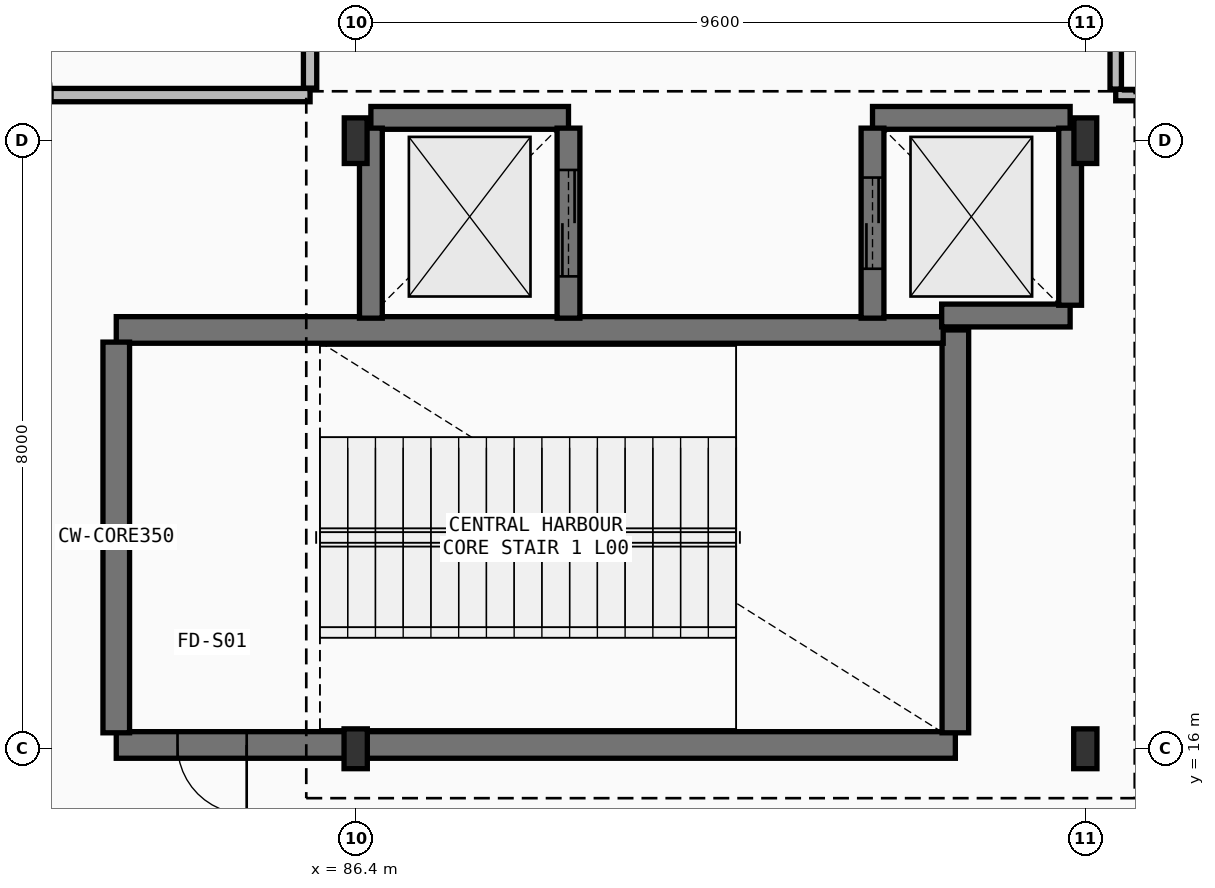
"""IFC4 building model, lengths in metres.
Left out: names, types, materials, properties, quantities, classifications, styles, units other than length and angle.
Written with IfcOpenShell. Run it as: python <this file> out.ifc"""

import sys

from ifc_helpers import new_model, si_unit, direction, frame, frame_2d, origin, origin_2d, place, context, subcontext, project, spatial, rectangle, i_section, extrude, element, fill, save


model = new_model("IFC4")
c1 = context("Model", 3, precision=1e-05, world=origin(), true_north=direction((0.0, 1.0)))
c2 = subcontext(c1, "Body", "Model", "MODEL_VIEW")
j1 = project(units=[si_unit("LENGTHUNIT", "METRE"), si_unit("PLANEANGLEUNIT", "RADIAN")], contexts=[c1])
p1 = place(None, origin())
s1 = spatial("IfcSite", under=j1, at=p1, CompositionType="ELEMENT")
p2 = place(p1, origin())
s2 = spatial("IfcBuilding", under=s1, at=p2, CompositionType="ELEMENT")
p3 = place(p2, origin())
s3 = spatial("IfcBuildingStorey", under=s2, at=p3, CompositionType="ELEMENT", Elevation=0.0)
p4 = place(p3, frame((86.4, 16.0, 0.0), z_axis=(0.0, 0.0, 1.0), x_axis=(1.0, 0.0, 0.0)))
e1 = element("IfcColumn", 1, at=p4, inside=s3, PredefinedType="COLUMN", context=c2, shape_type="SweptSolid", body=[
    extrude(i_section(OverallWidth=0.306, OverallDepth=0.524, WebThickness=0.021, FlangeThickness=0.04, FilletRadius=0.027, at=origin_2d()), origin(), (0.0, 0.0, 1.0), 6.0),
])
p5 = place(p3, frame((86.4, 24.0, 0.0), z_axis=(0.0, 0.0, 1.0), x_axis=(1.0, 0.0, 0.0)))
e2 = element("IfcColumn", 2, at=p5, inside=s3, PredefinedType="COLUMN", context=c2, shape_type="SweptSolid", body=[
    extrude(i_section(OverallWidth=0.3, OverallDepth=0.6, WebThickness=0.015, FlangeThickness=0.03, FilletRadius=0.027, at=origin_2d()), origin(), (0.0, 0.0, 1.0), 6.0),
])
p6 = place(p3, frame((96.0, 16.0, 0.0), z_axis=(0.0, 0.0, 1.0), x_axis=(1.0, 0.0, 0.0)))
e3 = element("IfcColumn", 3, at=p6, inside=s3, PredefinedType="COLUMN", context=c2, shape_type="SweptSolid", body=[
    extrude(i_section(OverallWidth=0.306, OverallDepth=0.524, WebThickness=0.021, FlangeThickness=0.04, FilletRadius=0.027, at=origin_2d()), origin(), (0.0, 0.0, 1.0), 6.0),
])
p7 = place(p3, frame((96.0, 24.0, 0.0), z_axis=(0.0, 0.0, 1.0), x_axis=(1.0, 0.0, 0.0)))
e4 = element("IfcColumn", 4, at=p7, inside=s3, PredefinedType="COLUMN", context=c2, shape_type="SweptSolid", body=[
    extrude(i_section(OverallWidth=0.3, OverallDepth=0.6, WebThickness=0.015, FlangeThickness=0.03, FilletRadius=0.027, at=origin_2d()), origin(), (0.0, 0.0, 1.0), 6.0),
])
p8 = place(p3, frame((94.29, 16.05, 0.0), z_axis=(0.0, 0.0, 1.0), x_axis=(-1.0, 0.0, 0.0)))
e5 = element("IfcWall", 5, at=p8, inside=s3, PredefinedType="SHEAR", context=c2, shape_type="SweptSolid", body=[
    extrude(rectangle(XDim=11.04, YDim=0.35, at=frame_2d((5.52, 0.0))), origin(), (0.0, 0.0, 1.0), 5.77),
])
p9 = place(p8, frame((9.324, 0.0, 0.0)))
e6 = element("IfcOpeningElement", 6, at=p9, cuts=e5, PredefinedType="OPENING", context=c2, shape_type="SweptSolid", body=[
    extrude(rectangle(XDim=0.91, YDim=2.08, at=frame_2d((0.455, 1.04))), frame((0.0, 0.185, 0.0), z_axis=(0.0, -1.0, 0.0), x_axis=(1.0, 0.0, 0.0)), (0.0, 0.0, 1.0), 0.37),
])
p10 = place(p3, frame((94.29, 21.51, 0.0), z_axis=(0.0, 0.0, 1.0), x_axis=(0.0, -1.0, 0.0)))
e7 = element("IfcWall", 7, at=p10, inside=s3, PredefinedType="SHEAR", context=c2, shape_type="SweptSolid", body=[
    extrude(rectangle(XDim=5.3, YDim=0.35, at=frame_2d((2.65, 0.0))), origin(), (0.0, 0.0, 1.0), 5.77),
])
p11 = place(p3, frame((83.25, 21.51, 0.0), z_axis=(0.0, 0.0, 1.0), x_axis=(1.0, 0.0, 0.0)))
e8 = element("IfcWall", 8, at=p11, inside=s3, PredefinedType="SHEAR", context=c2, shape_type="SweptSolid", body=[
    extrude(rectangle(XDim=10.88, YDim=0.35, at=frame_2d((5.44, 0.0))), origin(), (0.0, 0.0, 1.0), 5.77),
])
p12 = place(p3, frame((83.25, 16.21, 0.0), z_axis=(0.0, 0.0, 1.0), x_axis=(0.0, 1.0, 0.0)))
e9 = element("IfcWall", 9, at=p12, inside=s3, PredefinedType="SHEAR", context=c2, shape_type="SweptSolid", body=[
    extrude(rectangle(XDim=5.14, YDim=0.35, at=frame_2d((2.57, 0.0))), origin(), (0.0, 0.0, 1.0), 5.77),
])
p13 = place(p3, frame((89.2, 24.3, 0.0), z_axis=(0.0, 0.0, 1.0), x_axis=(-1.0, 0.0, 0.0)))
e10 = element("IfcWall", 10, at=p13, inside=s3, PredefinedType="SHEAR", context=c2, shape_type="SweptSolid", body=[
    extrude(rectangle(XDim=2.6, YDim=0.3, at=frame_2d((1.3, 0.0))), origin(), (0.0, 0.0, 1.0), 5.77),
])
p14 = place(p3, frame((89.2, 21.665, 0.0), z_axis=(0.0, 0.0, 1.0), x_axis=(0.0, 1.0, 0.0)))
e11 = element("IfcWall", 11, at=p14, inside=s3, PredefinedType="SHEAR", context=c2, shape_type="SweptSolid", body=[
    extrude(rectangle(XDim=2.5, YDim=0.3, at=frame_2d((1.25, 0.0))), origin(), (0.0, 0.0, 1.0), 5.77),
])
p15 = place(p14, frame((0.55, 0.0, 0.0)))
e12 = element("IfcOpeningElement", 12, at=p15, cuts=e11, PredefinedType="OPENING", context=c2, shape_type="SweptSolid", body=[
    extrude(rectangle(XDim=1.4, YDim=2.26, at=frame_2d((0.7, 1.13))), frame((0.0, 0.16, 0.0), z_axis=(0.0, -1.0, 0.0), x_axis=(1.0, 0.0, 0.0)), (0.0, 0.0, 1.0), 0.32),
])
p16 = place(p3, frame((86.6, 24.165, 0.0), z_axis=(0.0, 0.0, 1.0), x_axis=(0.0, -1.0, 0.0)))
e13 = element("IfcWall", 13, at=p16, inside=s3, PredefinedType="SHEAR", context=c2, shape_type="SweptSolid", body=[
    extrude(rectangle(XDim=2.5, YDim=0.3, at=frame_2d((1.25, 0.0))), origin(), (0.0, 0.0, 1.0), 5.77),
])
p17 = place(p3, frame((95.8, 24.3, 0.0), z_axis=(0.0, 0.0, 1.0), x_axis=(-1.0, 0.0, 0.0)))
e14 = element("IfcWall", 14, at=p17, inside=s3, PredefinedType="SHEAR", context=c2, shape_type="SweptSolid", body=[
    extrude(rectangle(XDim=2.6, YDim=0.3, at=frame_2d((1.3, 0.0))), origin(), (0.0, 0.0, 1.0), 5.77),
])
p18 = place(p3, frame((94.11, 21.7, 0.0), z_axis=(0.0, 0.0, 1.0), x_axis=(1.0, 0.0, 0.0)))
e15 = element("IfcWall", 15, at=p18, inside=s3, PredefinedType="SHEAR", context=c2, shape_type="SweptSolid", body=[
    extrude(rectangle(XDim=1.69, YDim=0.3, at=frame_2d((0.845, 0.0))), origin(), (0.0, 0.0, 1.0), 5.77),
])
p19 = place(p3, frame((95.8, 21.835, 0.0), z_axis=(0.0, 0.0, 1.0), x_axis=(0.0, 1.0, 0.0)))
e16 = element("IfcWall", 16, at=p19, inside=s3, PredefinedType="SHEAR", context=c2, shape_type="SweptSolid", body=[
    extrude(rectangle(XDim=2.33, YDim=0.3, at=frame_2d((1.165, 0.0))), origin(), (0.0, 0.0, 1.0), 5.77),
])
p20 = place(p3, frame((93.2, 24.165, 0.0), z_axis=(0.0, 0.0, 1.0), x_axis=(0.0, -1.0, 0.0)))
e17 = element("IfcWall", 17, at=p20, inside=s3, PredefinedType="SHEAR", context=c2, shape_type="SweptSolid", body=[
    extrude(rectangle(XDim=2.5, YDim=0.3, at=frame_2d((1.25, 0.0))), origin(), (0.0, 0.0, 1.0), 5.77),
])
p21 = place(p20, frame((0.65, 0.0, 0.0)))
e18 = element("IfcOpeningElement", 18, at=p21, cuts=e17, PredefinedType="OPENING", context=c2, shape_type="SweptSolid", body=[
    extrude(rectangle(XDim=1.2, YDim=2.2, at=frame_2d((0.6, 1.1))), frame((0.0, 0.16, 0.0), z_axis=(0.0, -1.0, 0.0), x_axis=(1.0, 0.0, 0.0)), (0.0, 0.0, 1.0), 0.32),
])
p22 = place(p3, frame((69.2, 24.6, 0.0), z_axis=(0.0, 0.0, 1.0), x_axis=(1.0, 0.0, 0.0)))
e19 = element("IfcWall", 19, at=p22, inside=s3, PredefinedType="PARTITIONING", context=c2, shape_type="SweptSolid", body=[
    extrude(rectangle(XDim=16.6, YDim=0.175, at=frame_2d((8.3, 0.0))), origin(), (0.0, 0.0, 1.0), 5.04),
])
p23 = place(p22, frame((3.62, 0.0, 0.0)))
e20 = element("IfcOpeningElement", 20, at=p23, cuts=e19, PredefinedType="OPENING", context=c2, shape_type="SweptSolid", body=[
    extrude(rectangle(XDim=2.12, YDim=2.38, at=frame_2d((1.06, 1.19))), frame((0.0, 0.097, 0.0), z_axis=(0.0, -1.0, 0.0), x_axis=(1.0, 0.0, 0.0)), (0.0, 0.0, 1.0), 0.195),
])
p24 = place(p22, frame((12.02, 0.0, 0.0)))
e21 = element("IfcOpeningElement", 21, at=p24, cuts=e19, PredefinedType="OPENING", context=c2, shape_type="SweptSolid", body=[
    extrude(rectangle(XDim=1.19, YDim=2.34, at=frame_2d((0.595, 1.17))), frame((0.0, 0.097, 0.0), z_axis=(0.0, -1.0, 0.0), x_axis=(1.0, 0.0, 0.0)), (0.0, 0.0, 1.0), 0.195),
])
p25 = place(p3, frame((85.8, 24.691, 0.0), z_axis=(0.0, 0.0, 1.0), x_axis=(0.0, 1.0, 0.0)))
e22 = element("IfcWall", 22, at=p25, inside=s3, PredefinedType="PARTITIONING", context=c2, shape_type="SweptSolid", body=[
    extrude(rectangle(XDim=14.708, YDim=0.175, at=frame_2d((7.354, 0.0))), origin(), (0.0, 0.0, 1.0), 5.14),
])
p26 = place(p3, frame((96.4, 24.6, 0.0), z_axis=(0.0, 0.0, 1.0), x_axis=(1.0, 0.0, 0.0)))
e23 = element("IfcWall", 23, at=p26, inside=s3, PredefinedType="PARTITIONING", context=c2, shape_type="SweptSolid", body=[
    extrude(rectangle(XDim=18.2, YDim=0.15, at=frame_2d((9.1, 0.0))), origin(), (0.0, 0.0, 1.0), 5.14),
])
p27 = place(p26, frame((11.037, 0.0, 0.0)))
e24 = element("IfcOpeningElement", 24, at=p27, cuts=e23, PredefinedType="OPENING", context=c2, shape_type="SweptSolid", body=[
    extrude(rectangle(XDim=1.22, YDim=2.36, at=frame_2d((0.61, 1.18))), frame((0.0, 0.085, 0.0), z_axis=(0.0, -1.0, 0.0), x_axis=(1.0, 0.0, 0.0)), (0.0, 0.0, 1.0), 0.17),
])
p28 = place(p3, frame((96.4, 39.321, 0.0), z_axis=(0.0, 0.0, 1.0), x_axis=(0.0, -1.0, 0.0)))
e25 = element("IfcWall", 25, at=p28, inside=s3, PredefinedType="PARTITIONING", context=c2, shape_type="SweptSolid", body=[
    extrude(rectangle(XDim=14.642, YDim=0.15, at=frame_2d((7.321, 0.0))), origin(), (0.0, 0.0, 1.0), 5.24),
])
p29 = place(p9, origin())
e26 = element("IfcDoor", 26, at=p29, inside=s3, OperationType="SINGLE_SWING_RIGHT", PredefinedType="DOOR", context=c2, shape_type="SweptSolid", body=[
    extrude(rectangle(XDim=0.91, YDim=2.08, at=frame_2d((0.455, 1.04))), frame((0.0, 0.025, 0.0), z_axis=(0.0, -1.0, 0.0), x_axis=(1.0, 0.0, 0.0)), (0.0, 0.0, 1.0), 0.05),
])
fill(e6, e26)
p30 = place(p15, origin())
e27 = element("IfcDoor", 27, at=p30, inside=s3, OperationType="DOUBLE_DOOR_SLIDING", PredefinedType="DOOR", context=c2, shape_type="SweptSolid", body=[
    extrude(rectangle(XDim=1.4, YDim=2.26, at=frame_2d((0.7, 1.13))), frame((0.0, 0.025, 0.0), z_axis=(0.0, -1.0, 0.0), x_axis=(1.0, 0.0, 0.0)), (0.0, 0.0, 1.0), 0.05),
])
fill(e12, e27)
p31 = place(p21, origin())
e28 = element("IfcDoor", 28, at=p31, inside=s3, OperationType="DOUBLE_DOOR_SLIDING", PredefinedType="DOOR", context=c2, shape_type="SweptSolid", body=[
    extrude(rectangle(XDim=1.2, YDim=2.2, at=frame_2d((0.6, 1.1))), frame((0.0, 0.025, 0.0), z_axis=(0.0, -1.0, 0.0), x_axis=(1.0, 0.0, 0.0)), (0.0, 0.0, 1.0), 0.05),
])
fill(e18, e28)
save(model, sys.argv[1])
